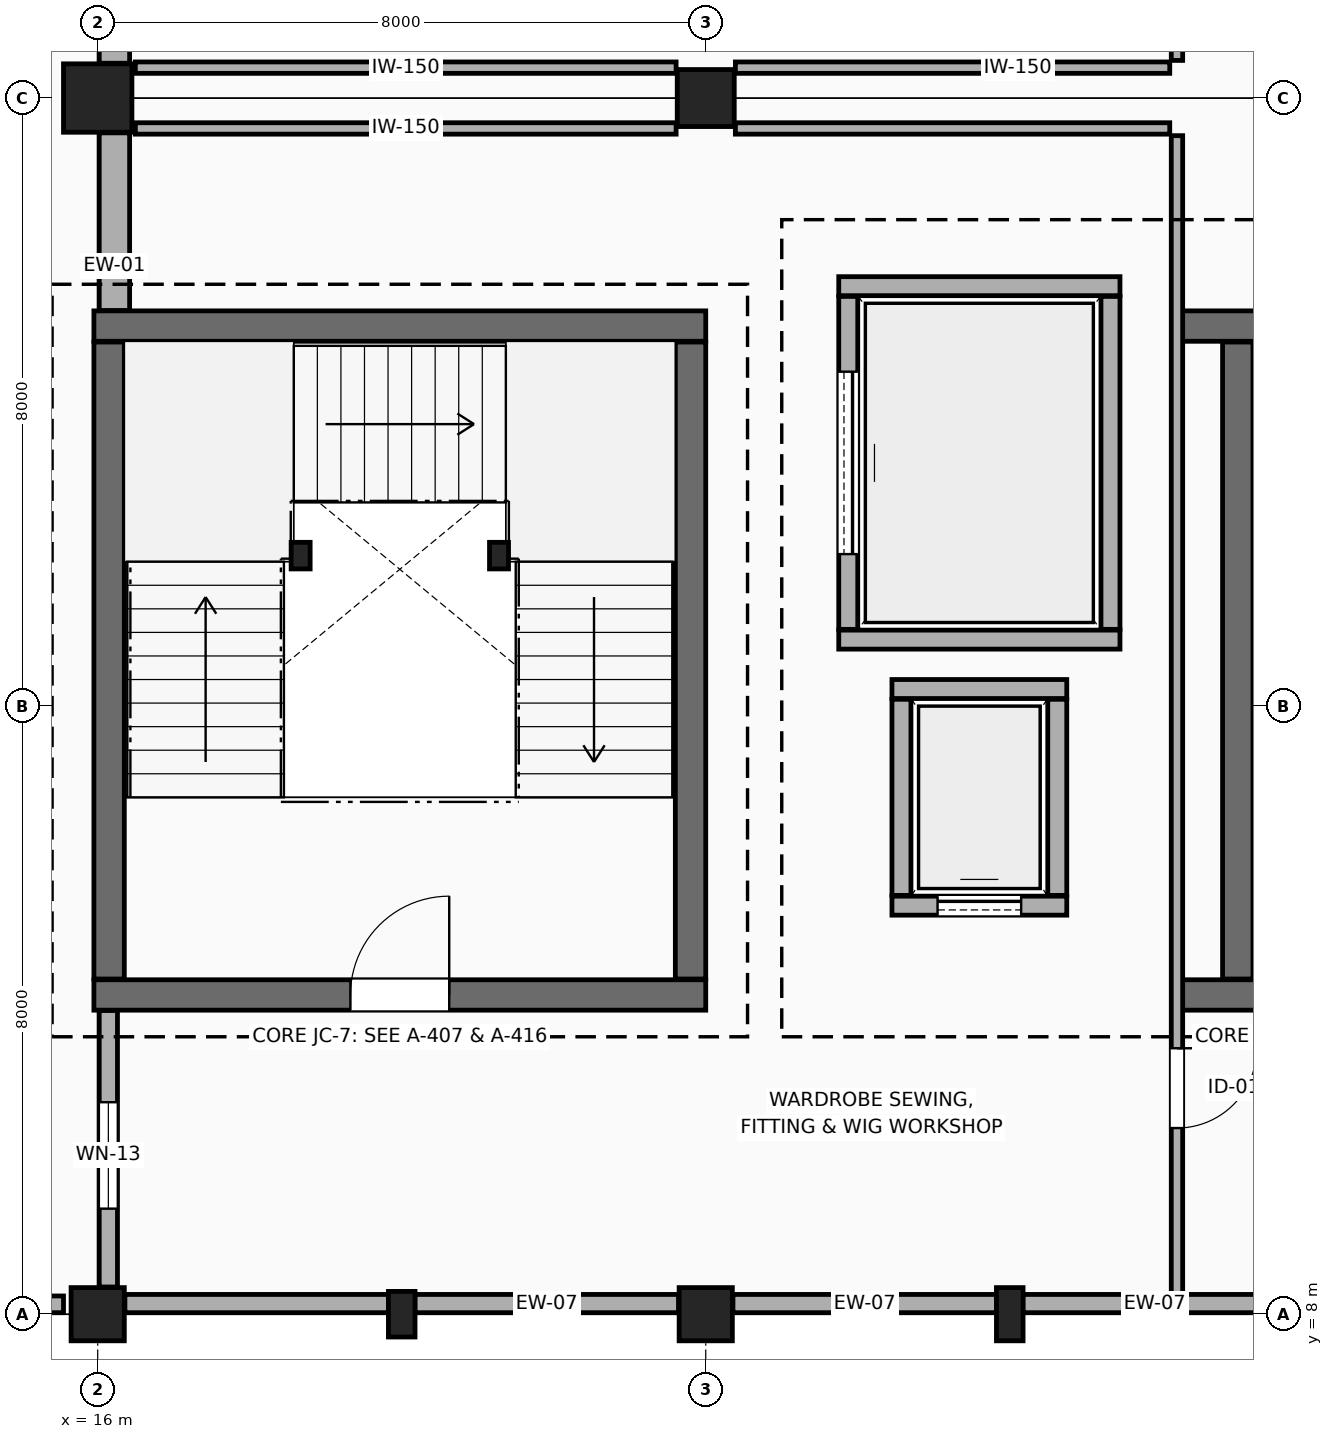
"""IFC4 building model, lengths in metres.
Left out: names, types, materials, properties, quantities, classifications, styles, units other than length and angle.
Written with IfcOpenShell. Run it as: python <this file> out.ifc"""

import sys

from ifc_helpers import new_model, si_unit, direction, frame, frame_2d, origin, origin_2d, place, context, subcontext, project, spatial, rectangle, circle, i_section, extrude, element, fill, save


model = new_model("IFC4")
c1 = context("Model", 3, precision=1e-05, world=origin(), true_north=direction((0.0, 1.0)))
c2 = subcontext(c1, "Body", "Model", "MODEL_VIEW")
j1 = project(units=[si_unit("LENGTHUNIT", "METRE"), si_unit("PLANEANGLEUNIT", "RADIAN")], contexts=[c1])
p1 = place(None, origin())
s1 = spatial("IfcSite", under=j1, at=p1, CompositionType="ELEMENT")
p2 = place(p1, origin())
s2 = spatial("IfcBuilding", under=s1, at=p2, CompositionType="ELEMENT")
p3 = place(p2, frame((0.0, 0.0, 5.4)))
s3 = spatial("IfcBuildingStorey", under=s2, at=p3, CompositionType="ELEMENT", Elevation=5.4)
p4 = place(p3, frame((16.0, 8.0, 0.0), z_axis=(0.0, 0.0, 1.0), x_axis=(1.0, 0.0, 0.0)))
e1 = element("IfcColumn", 1, at=p4, inside=s3, PredefinedType="COLUMN", context=c2, shape_type="SweptSolid", body=[
    extrude(circle(Radius=0.35, at=origin_2d()), origin(), (0.0, 0.0, 1.0), 4.8),
])
p5 = place(p3, frame((16.0, 24.0, 0.0), z_axis=(0.0, 0.0, 1.0), x_axis=(1.0, 0.0, 0.0)))
e2 = element("IfcColumn", 2, at=p5, inside=s3, PredefinedType="COLUMN", context=c2, shape_type="SweptSolid", body=[
    extrude(rectangle(XDim=0.9, YDim=0.9, at=origin_2d()), origin(), (0.0, 0.0, 1.0), 4.8),
])
p6 = place(p3, frame((24.0, 8.0, 0.0), z_axis=(0.0, 0.0, 1.0), x_axis=(1.0, 0.0, 0.0)))
e3 = element("IfcColumn", 3, at=p6, inside=s3, PredefinedType="COLUMN", context=c2, shape_type="SweptSolid", body=[
    extrude(circle(Radius=0.35, at=origin_2d()), origin(), (0.0, 0.0, 1.0), 4.8),
])
p7 = place(p3, frame((24.0, 24.0, 0.0), z_axis=(0.0, 0.0, 1.0), x_axis=(1.0, 0.0, 0.0)))
e4 = element("IfcColumn", 4, at=p7, inside=s3, PredefinedType="COLUMN", context=c2, shape_type="SweptSolid", body=[
    extrude(rectangle(XDim=0.75, YDim=0.75, at=origin_2d()), origin(), (0.0, 0.0, 1.0), 4.8),
])
for number, where, z_axis, x_axis in (
    (5, (18.67, 17.98, 0.0), (0.0, 0.0, 1.0), (1.0, 0.0, 0.0)),
    (6, (21.28, 17.98, 0.0), (0.0, 0.0, 1.0), (1.0, 0.0, 0.0)),
):
    element("IfcColumn", number, at=place(p3, frame(where, z_axis=z_axis, x_axis=x_axis)), inside=s3, PredefinedType="COLUMN", context=c2, shape_type="SweptSolid", body=[
        extrude(i_section(OverallWidth=0.25, OverallDepth=0.35, WebThickness=0.01, FlangeThickness=0.012, FilletRadius=0.012, at=origin_2d()), origin(), (0.0, 0.0, 1.0), 4.76),
    ])
p8 = place(p3, frame((20.0, 8.0, 0.0), z_axis=(0.0, 0.0, 1.0), x_axis=(1.0, 0.0, 0.0)))
e7 = element("IfcColumn", 7, at=p8, inside=s3, PredefinedType="PILASTER", context=c2, shape_type="SweptSolid", body=[
    extrude(rectangle(XDim=0.35, YDim=0.6, at=origin_2d()), origin(), (0.0, 0.0, 1.0), 4.8),
])
p9 = place(p3, frame((28.0, 8.0, 0.0), z_axis=(0.0, 0.0, 1.0), x_axis=(1.0, 0.0, 0.0)))
e8 = element("IfcColumn", 8, at=p9, inside=s3, PredefinedType="PILASTER", context=c2, shape_type="SweptSolid", body=[
    extrude(rectangle(XDim=0.35, YDim=0.7, at=origin_2d()), origin(), (0.0, 0.0, 1.0), 4.8),
])
for number, where, z_axis, x_axis in (
    (9, (31.642, 8.14, 0.0), (0.0, 0.0, 1.0), (-1.0, 0.0, 0.0)),
    (10, (27.828, 8.14, 0.0), (0.0, 0.0, 1.0), (-1.0, 0.0, 0.0)),
):
    element("IfcWall", number, at=place(p3, frame(where, z_axis=z_axis, x_axis=x_axis)), inside=s3, PredefinedType="ELEMENTEDWALL", context=c2, shape_type="SweptSolid", body=[
        extrude(rectangle(XDim=3.47, YDim=0.24, at=frame_2d((1.735, 0.0))), origin(), (0.0, 0.0, 1.0), 4.075),
    ])
for number, where, z_axis, x_axis in (
    (11, (23.642, 8.14, 0.0), (0.0, 0.0, 1.0), (-1.0, 0.0, 0.0)),
    (12, (19.828, 8.14, 0.0), (0.0, 0.0, 1.0), (-1.0, 0.0, 0.0)),
):
    element("IfcWall", number, at=place(p3, frame(where, z_axis=z_axis, x_axis=x_axis)), inside=s3, PredefinedType="ELEMENTEDWALL", context=c2, shape_type="SweptSolid", body=[
        extrude(rectangle(XDim=3.47, YDim=0.24, at=frame_2d((1.735, 0.0))), origin(), (0.0, 0.0, 1.0), 3.875),
    ])
p10 = place(p3, frame((16.14, 8.358, 0.0), z_axis=(0.0, 0.0, 1.0), x_axis=(0.0, 1.0, 0.0)))
e13 = element("IfcWall", 13, at=p10, inside=s3, PredefinedType="ELEMENTEDWALL", context=c2, shape_type="SweptSolid", body=[
    extrude(rectangle(XDim=3.638, YDim=0.24, at=frame_2d((1.819, 0.0))), origin(), (0.0, 0.0, 1.0), 4.54),
])
p11 = place(p10, frame((1.031, 0.0, 0.95)))
e14 = element("IfcOpeningElement", 14, at=p11, cuts=e13, PredefinedType="OPENING", context=c2, shape_type="SweptSolid", body=[
    extrude(rectangle(XDim=1.4, YDim=1.2, at=frame_2d((0.7, 0.6))), frame((0.0, 0.13, 0.0), z_axis=(0.0, -1.0, 0.0), x_axis=(1.0, 0.0, 0.0)), (0.0, 0.0, 1.0), 0.26),
])
p12 = place(p3, frame((16.22, 21.204, 0.0), z_axis=(0.0, 0.0, 1.0), x_axis=(0.0, 1.0, 0.0)))
e15 = element("IfcWall", 15, at=p12, inside=s3, PredefinedType="STANDARD", context=c2, shape_type="SweptSolid", body=[
    extrude(rectangle(XDim=2.338, YDim=0.4, at=frame_2d((1.169, 0.0))), origin(), (0.0, 0.0, 1.0), 4.54),
])
p13 = place(p3, frame((16.22, 24.458, 0.0), z_axis=(0.0, 0.0, 1.0), x_axis=(0.0, 1.0, 0.0)))
e16 = element("IfcWall", 16, at=p13, inside=s3, PredefinedType="STANDARD", context=c2, shape_type="SweptSolid", body=[
    extrude(rectangle(XDim=7.084, YDim=0.4, at=frame_2d((3.542, 0.0))), origin(), (0.0, 0.0, 1.0), 3.975),
])
p14 = place(p13, frame((2.842, 0.0, 0.95)))
e17 = element("IfcOpeningElement", 17, at=p14, cuts=e16, PredefinedType="OPENING", context=c2, shape_type="SweptSolid", body=[
    extrude(rectangle(XDim=1.4, YDim=1.5, at=frame_2d((0.7, 0.75))), frame((0.0, 0.21, 0.0), z_axis=(0.0, -1.0, 0.0), x_axis=(1.0, 0.0, 0.0)), (0.0, 0.0, 1.0), 0.42),
])
p15 = place(p3, frame((15.55, 8.13, 0.0), z_axis=(0.0, 0.0, 1.0), x_axis=(-1.0, 0.0, 0.0)))
e18 = element("IfcWall", 18, at=p15, inside=s3, PredefinedType="PARAPET", context=c2, shape_type="SweptSolid", body=[
    extrude(rectangle(XDim=7.4, YDim=0.22, at=frame_2d((3.7, 0.0))), origin(), (0.0, 0.0, 1.0), 1.15),
])
p16 = place(p3, frame((30.274, 12.2, 0.0), z_axis=(0.0, 0.0, 1.0), x_axis=(1.0, 0.0, 0.0)))
e19 = element("IfcWall", 19, at=p16, inside=s3, PredefinedType="SHEAR", context=c2, shape_type="SweptSolid", body=[
    extrude(rectangle(XDim=8.926, YDim=0.4, at=frame_2d((4.463, 0.0))), origin(), (0.0, 0.0, 1.0), 4.54),
])
p17 = place(p16, frame((4.076, 0.0, 0.0)))
e20 = element("IfcOpeningElement", 20, at=p17, cuts=e19, PredefinedType="OPENING", context=c2, shape_type="SweptSolid", body=[
    extrude(rectangle(XDim=1.3, YDim=2.15, at=frame_2d((0.65, 1.075))), frame((0.0, 0.21, 0.0), z_axis=(0.0, -1.0, 0.0), x_axis=(1.0, 0.0, 0.0)), (0.0, 0.0, 1.0), 0.42),
])
p18 = place(p3, frame((39.2, 21.0, 0.0), z_axis=(0.0, 0.0, 1.0), x_axis=(-1.0, 0.0, 0.0)))
e21 = element("IfcWall", 21, at=p18, inside=s3, PredefinedType="SHEAR", context=c2, shape_type="SweptSolid", body=[
    extrude(rectangle(XDim=8.926, YDim=0.4, at=frame_2d((4.463, 0.0))), origin(), (0.0, 0.0, 1.0), 4.54),
])
p19 = place(p3, frame((31.0, 20.79, 0.0), z_axis=(0.0, 0.0, 1.0), x_axis=(0.0, -1.0, 0.0)))
e22 = element("IfcWall", 22, at=p19, inside=s3, PredefinedType="SHEAR", context=c2, shape_type="SweptSolid", body=[
    extrude(rectangle(XDim=8.38, YDim=0.4, at=frame_2d((4.19, 0.0))), origin(), (0.0, 0.0, 1.0), 4.54),
])
p20 = place(p3, frame((26.45, 13.375, 0.0), z_axis=(0.0, 0.0, 1.0), x_axis=(1.0, 0.0, 0.0)))
e23 = element("IfcWall", 23, at=p20, inside=s3, PredefinedType="STANDARD", context=c2, shape_type="SweptSolid", body=[
    extrude(rectangle(XDim=2.3, YDim=0.25, at=frame_2d((1.15, 0.0))), origin(), (0.0, 0.0, 1.0), 4.53),
])
p21 = place(p20, frame((0.6, 0.0, 0.0)))
e24 = element("IfcOpeningElement", 24, at=p21, cuts=e23, PredefinedType="OPENING", context=c2, shape_type="SweptSolid", body=[
    extrude(rectangle(XDim=1.1, YDim=2.15, at=frame_2d((0.55, 1.075))), frame((0.0, 0.135, 0.0), z_axis=(0.0, -1.0, 0.0), x_axis=(1.0, 0.0, 0.0)), (0.0, 0.0, 1.0), 0.27),
])
p22 = place(p3, frame((28.75, 16.225, 0.0), z_axis=(0.0, 0.0, 1.0), x_axis=(-1.0, 0.0, 0.0)))
e25 = element("IfcWall", 25, at=p22, inside=s3, PredefinedType="STANDARD", context=c2, shape_type="SweptSolid", body=[
    extrude(rectangle(XDim=2.3, YDim=0.25, at=frame_2d((1.15, 0.0))), origin(), (0.0, 0.0, 1.0), 4.53),
])
for number, where, z_axis, x_axis in (
    (26, (28.625, 13.51, 0.0), (0.0, 0.0, 1.0), (0.0, 1.0, 0.0)),
    (27, (26.575, 16.09, 0.0), (0.0, 0.0, 1.0), (0.0, -1.0, 0.0)),
):
    element("IfcWall", number, at=place(p3, frame(where, z_axis=z_axis, x_axis=x_axis)), inside=s3, PredefinedType="STANDARD", context=c2, shape_type="SweptSolid", body=[
        extrude(rectangle(XDim=2.58, YDim=0.25, at=frame_2d((1.29, 0.0))), origin(), (0.0, 0.0, 1.0), 4.53),
    ])
for number, where, z_axis, x_axis in (
    (28, (25.75, 16.875, 0.0), (0.0, 0.0, 1.0), (1.0, 0.0, 0.0)),
    (29, (29.45, 21.525, 0.0), (0.0, 0.0, 1.0), (-1.0, 0.0, 0.0)),
):
    element("IfcWall", number, at=place(p3, frame(where, z_axis=z_axis, x_axis=x_axis)), inside=s3, PredefinedType="STANDARD", context=c2, shape_type="SweptSolid", body=[
        extrude(rectangle(XDim=3.7, YDim=0.25, at=frame_2d((1.85, 0.0))), origin(), (0.0, 0.0, 1.0), 4.53),
    ])
p23 = place(p3, frame((29.325, 17.01, 0.0), z_axis=(0.0, 0.0, 1.0), x_axis=(0.0, 1.0, 0.0)))
e30 = element("IfcWall", 30, at=p23, inside=s3, PredefinedType="STANDARD", context=c2, shape_type="SweptSolid", body=[
    extrude(rectangle(XDim=4.38, YDim=0.25, at=frame_2d((2.19, 0.0))), origin(), (0.0, 0.0, 1.0), 4.53),
])
p24 = place(p3, frame((25.875, 21.39, 0.0), z_axis=(0.0, 0.0, 1.0), x_axis=(0.0, -1.0, 0.0)))
e31 = element("IfcWall", 31, at=p24, inside=s3, PredefinedType="STANDARD", context=c2, shape_type="SweptSolid", body=[
    extrude(rectangle(XDim=4.38, YDim=0.25, at=frame_2d((2.19, 0.0))), origin(), (0.0, 0.0, 1.0), 4.53),
])
p25 = place(p24, frame((0.99, 0.0, 0.0)))
e32 = element("IfcOpeningElement", 32, at=p25, cuts=e31, PredefinedType="OPENING", context=c2, shape_type="SweptSolid", body=[
    extrude(rectangle(XDim=2.4, YDim=2.55, at=frame_2d((1.2, 1.275))), frame((0.0, 0.135, 0.0), z_axis=(0.0, -1.0, 0.0), x_axis=(1.0, 0.0, 0.0)), (0.0, 0.0, 1.0), 0.27),
])
p26 = place(p3, frame((15.95, 12.2, 0.0), z_axis=(0.0, 0.0, 1.0), x_axis=(1.0, 0.0, 0.0)))
e33 = element("IfcWall", 33, at=p26, inside=s3, PredefinedType="SHEAR", context=c2, shape_type="SweptSolid", body=[
    extrude(rectangle(XDim=8.05, YDim=0.4, at=frame_2d((4.025, 0.0))), origin(), (0.0, 0.0, 1.0), 4.54),
])
p27 = place(p26, frame((3.375, 0.0, 0.0)))
e34 = element("IfcOpeningElement", 34, at=p27, cuts=e33, PredefinedType="OPENING", context=c2, shape_type="SweptSolid", body=[
    extrude(rectangle(XDim=1.3, YDim=2.15, at=frame_2d((0.65, 1.075))), frame((0.0, 0.21, 0.0), z_axis=(0.0, -1.0, 0.0), x_axis=(1.0, 0.0, 0.0)), (0.0, 0.0, 1.0), 0.42),
])
p28 = place(p3, frame((24.0, 21.0, 0.0), z_axis=(0.0, 0.0, 1.0), x_axis=(-1.0, 0.0, 0.0)))
e35 = element("IfcWall", 35, at=p28, inside=s3, PredefinedType="SHEAR", context=c2, shape_type="SweptSolid", body=[
    extrude(rectangle(XDim=8.05, YDim=0.4, at=frame_2d((4.025, 0.0))), origin(), (0.0, 0.0, 1.0), 4.54),
])
for number, where, z_axis, x_axis in (
    (36, (23.8, 12.41, 0.0), (0.0, 0.0, 1.0), (0.0, 1.0, 0.0)),
    (37, (16.15, 20.79, 0.0), (0.0, 0.0, 1.0), (0.0, -1.0, 0.0)),
):
    element("IfcWall", number, at=place(p3, frame(where, z_axis=z_axis, x_axis=x_axis)), inside=s3, PredefinedType="SHEAR", context=c2, shape_type="SweptSolid", body=[
        extrude(rectangle(XDim=8.38, YDim=0.4, at=frame_2d((4.19, 0.0))), origin(), (0.0, 0.0, 1.0), 4.54),
    ])
p29 = place(p3, frame((30.2, 39.705, 0.0), z_axis=(0.0, 0.0, 1.0), x_axis=(0.0, -1.0, 0.0)))
e38 = element("IfcWall", 38, at=p29, inside=s3, PredefinedType="PARTITIONING", context=c2, shape_type="SweptSolid", body=[
    extrude(rectangle(XDim=15.21, YDim=0.15, at=frame_2d((7.605, 0.0))), origin(), (0.0, 0.0, 1.0), 4.53),
])
p30 = place(p29, frame((4.991, 0.0, 0.0)))
e39 = element("IfcOpeningElement", 39, at=p30, cuts=e38, PredefinedType="OPENING", context=c2, shape_type="SweptSolid", body=[
    extrude(rectangle(XDim=0.95, YDim=2.15, at=frame_2d((0.475, 1.075))), frame((0.0, 0.085, 0.0), z_axis=(0.0, -1.0, 0.0), x_axis=(1.0, 0.0, 0.0)), (0.0, 0.0, 1.0), 0.17),
])
p31 = place(p3, frame((30.105, 24.4, 0.0), z_axis=(0.0, 0.0, 1.0), x_axis=(-1.0, 0.0, 0.0)))
e40 = element("IfcWall", 40, at=p31, inside=s3, PredefinedType="PARTITIONING", context=c2, shape_type="SweptSolid", body=[
    extrude(rectangle(XDim=5.715, YDim=0.15, at=frame_2d((2.857, 0.0))), origin(), (0.0, 0.0, 1.0), 3.77),
])
p32 = place(p3, frame((23.61, 24.4, 0.0), z_axis=(0.0, 0.0, 1.0), x_axis=(-1.0, 0.0, 0.0)))
e41 = element("IfcWall", 41, at=p32, inside=s3, PredefinedType="PARTITIONING", context=c2, shape_type="SweptSolid", body=[
    extrude(rectangle(XDim=7.115, YDim=0.15, at=frame_2d((3.558, 0.0))), origin(), (0.0, 0.0, 1.0), 3.67),
])
p33 = place(p3, frame((30.2, 23.505, 0.0), z_axis=(0.0, 0.0, 1.0), x_axis=(0.0, -1.0, 0.0)))
e42 = element("IfcWall", 42, at=p33, inside=s3, PredefinedType="PARTITIONING", context=c2, shape_type="SweptSolid", body=[
    extrude(rectangle(XDim=15.241, YDim=0.15, at=frame_2d((7.621, 0.0))), origin(), (0.0, 0.0, 1.0), 4.53),
])
p34 = place(p33, frame((12.006, 0.0, 0.0)))
e43 = element("IfcOpeningElement", 43, at=p34, cuts=e42, PredefinedType="OPENING", context=c2, shape_type="SweptSolid", body=[
    extrude(rectangle(XDim=1.05, YDim=2.15, at=frame_2d((0.525, 1.075))), frame((0.0, 0.085, 0.0), z_axis=(0.0, -1.0, 0.0), x_axis=(1.0, 0.0, 0.0)), (0.0, 0.0, 1.0), 0.17),
])
p35 = place(p3, frame((16.495, 23.6, 0.0), z_axis=(0.0, 0.0, 1.0), x_axis=(1.0, 0.0, 0.0)))
e44 = element("IfcWall", 44, at=p35, inside=s3, PredefinedType="PARTITIONING", context=c2, shape_type="SweptSolid", body=[
    extrude(rectangle(XDim=7.115, YDim=0.15, at=frame_2d((3.558, 0.0))), origin(), (0.0, 0.0, 1.0), 3.67),
])
p36 = place(p3, frame((24.39, 23.6, 0.0), z_axis=(0.0, 0.0, 1.0), x_axis=(1.0, 0.0, 0.0)))
e45 = element("IfcWall", 45, at=p36, inside=s3, PredefinedType="PARTITIONING", context=c2, shape_type="SweptSolid", body=[
    extrude(rectangle(XDim=5.715, YDim=0.15, at=frame_2d((2.857, 0.0))), origin(), (0.0, 0.0, 1.0), 3.77),
])
p37 = place(p11, origin())
e46 = element("IfcWindow", 46, at=p37, inside=s3, PartitioningType="SINGLE_PANEL", PredefinedType="WINDOW", context=c2, shape_type="SweptSolid", body=[
    extrude(rectangle(XDim=1.4, YDim=1.2, at=frame_2d((0.7, 0.6))), frame((0.0, 0.03, 0.0), z_axis=(0.0, -1.0, 0.0), x_axis=(1.0, 0.0, 0.0)), (0.0, 0.0, 1.0), 0.06),
])
fill(e14, e46)
p38 = place(p21, origin())
e47 = element("IfcDoor", 47, at=p38, inside=s3, OperationType="DOUBLE_DOOR_SLIDING", PredefinedType="DOOR", context=c2, shape_type="SweptSolid", body=[
    extrude(rectangle(XDim=1.1, YDim=2.15, at=frame_2d((0.55, 1.075))), frame((0.0, 0.025, 0.0), z_axis=(0.0, -1.0, 0.0), x_axis=(1.0, 0.0, 0.0)), (0.0, 0.0, 1.0), 0.05),
])
fill(e24, e47)
p39 = place(p25, origin())
e48 = element("IfcDoor", 48, at=p39, inside=s3, OperationType="DOUBLE_DOOR_SLIDING", PredefinedType="DOOR", context=c2, shape_type="SweptSolid", body=[
    extrude(rectangle(XDim=2.4, YDim=2.55, at=frame_2d((1.2, 1.275))), frame((0.0, 0.025, 0.0), z_axis=(0.0, -1.0, 0.0), x_axis=(1.0, 0.0, 0.0)), (0.0, 0.0, 1.0), 0.05),
])
fill(e32, e48)
p40 = place(p27, origin())
e49 = element("IfcDoor", 49, at=p40, inside=s3, OperationType="SINGLE_SWING_RIGHT", PredefinedType="DOOR", context=c2, shape_type="SweptSolid", body=[
    extrude(rectangle(XDim=1.3, YDim=2.15, at=frame_2d((0.65, 1.075))), frame((0.0, 0.025, 0.0), z_axis=(0.0, -1.0, 0.0), x_axis=(1.0, 0.0, 0.0)), (0.0, 0.0, 1.0), 0.05),
])
fill(e34, e49)
p41 = place(p34, origin())
e50 = element("IfcDoor", 50, at=p41, inside=s3, OperationType="SINGLE_SWING_LEFT", PredefinedType="DOOR", context=c2, shape_type="SweptSolid", body=[
    extrude(rectangle(XDim=1.05, YDim=2.15, at=frame_2d((0.525, 1.075))), frame((0.0, 0.025, 0.0), z_axis=(0.0, -1.0, 0.0), x_axis=(1.0, 0.0, 0.0)), (0.0, 0.0, 1.0), 0.05),
])
fill(e43, e50)
save(model, sys.argv[1])
